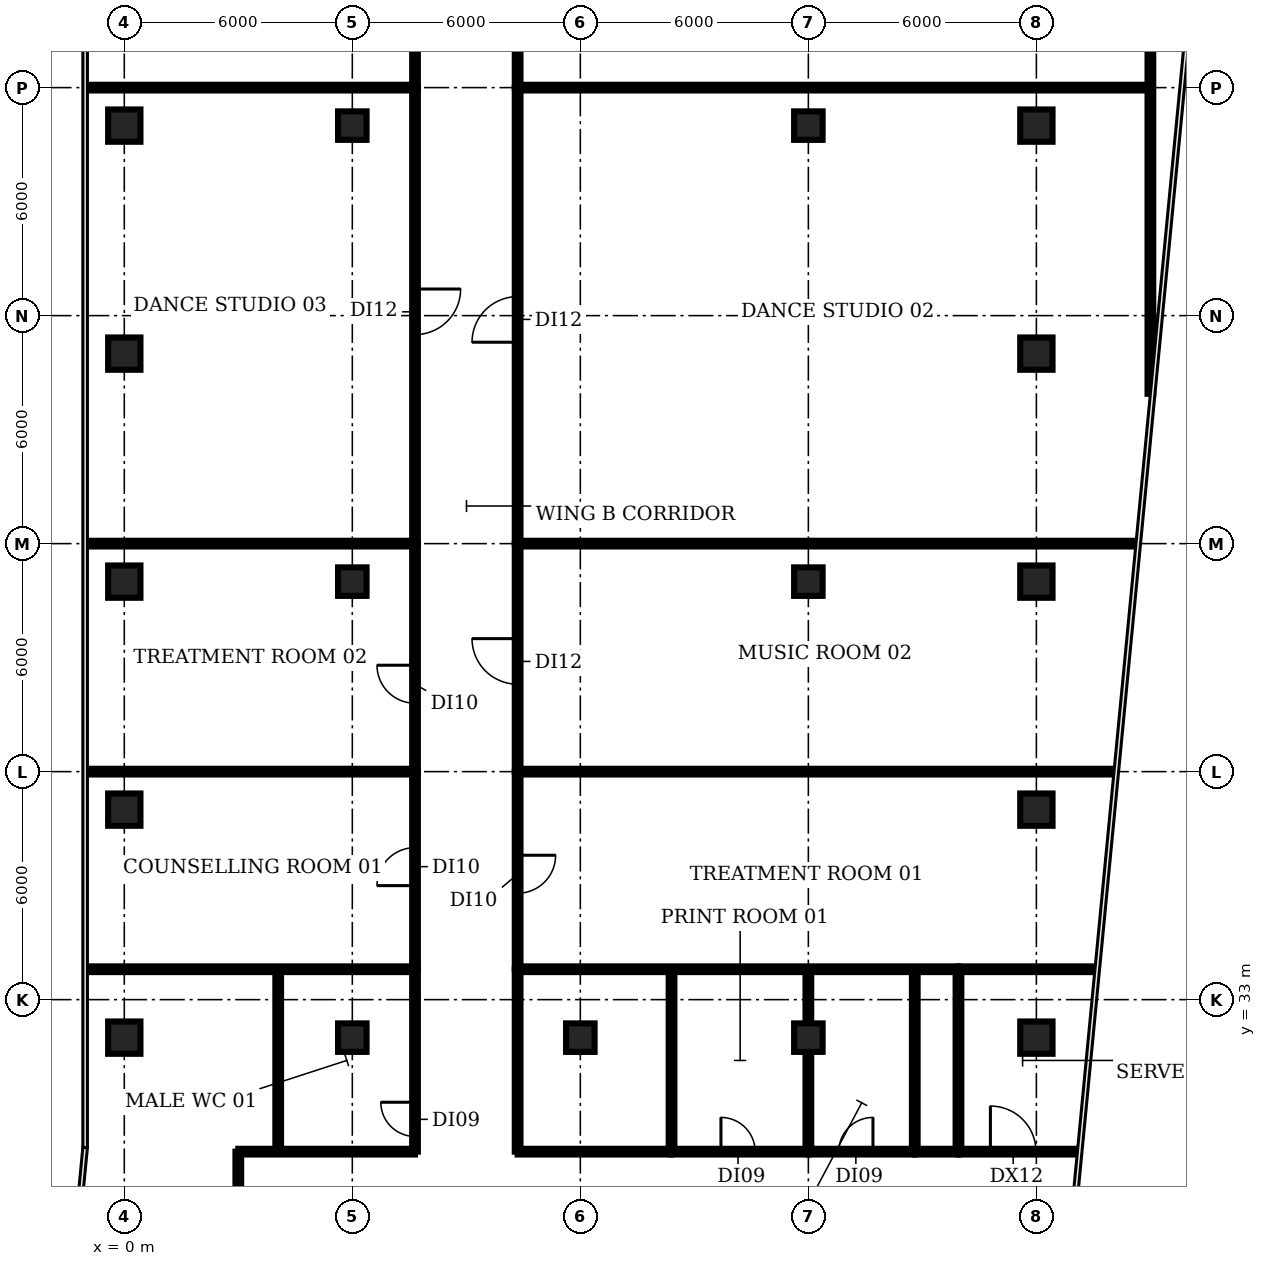
"""IFC4 building model, lengths in metres.
Left out: names, types, materials, properties, quantities, classifications, styles, units other than length and angle.
Written with IfcOpenShell. Run it as: python <this file> out.ifc"""

import sys

from ifc_helpers import new_model, si_unit, direction, frame, frame_2d, origin, origin_2d, place, context, subcontext, project, spatial, rectangle, extrude, element, fill, save


model = new_model("IFC4")
c1 = context("Model", 3, precision=1e-05, world=origin(), true_north=direction((0.0, 1.0)))
c2 = subcontext(c1, "Body", "Model", "MODEL_VIEW")
j1 = project(units=[si_unit("LENGTHUNIT", "METRE"), si_unit("PLANEANGLEUNIT", "RADIAN")], contexts=[c1])
p1 = place(None, origin())
s1 = spatial("IfcSite", under=j1, at=p1, CompositionType="ELEMENT")
p2 = place(p1, origin())
s2 = spatial("IfcBuilding", under=s1, at=p2, CompositionType="ELEMENT")
p3 = place(p2, frame((0.0, 0.0, 264.2)))
s3 = spatial("IfcBuildingStorey", under=s2, at=p3, CompositionType="ELEMENT", Elevation=264.2)
for number, where, z_axis, x_axis in (
    (1, (0.0, 32.0, -0.35), (0.0, 0.0, 1.0), (1.0, 0.0, 0.0)),
    (2, (0.0, 38.0, -0.35), (0.0, 0.0, 1.0), (1.0, 0.0, 0.0)),
    (3, (0.0, 44.0, -0.35), (0.0, 0.0, 1.0), (1.0, 0.0, 0.0)),
    (4, (0.0, 50.0, -0.35), (0.0, 0.0, 1.0), (1.0, 0.0, 0.0)),
    (5, (0.0, 56.0, -0.35), (0.0, 0.0, 1.0), (1.0, 0.0, 0.0)),
):
    element("IfcColumn", number, at=place(p3, frame(where, z_axis=z_axis, x_axis=x_axis)), inside=s3, PredefinedType="COLUMN", context=c2, shape_type="SweptSolid", body=[
        extrude(rectangle(XDim=0.85, YDim=0.85, at=origin_2d()), origin(), (0.0, 0.0, 1.0), 4.2),
    ])
for number, where, z_axis, x_axis in (
    (6, (6.0, 32.0, -0.35), (0.0, 0.0, 1.0), (1.0, 0.0, 0.0)),
    (7, (6.0, 44.0, -0.35), (0.0, 0.0, 1.0), (1.0, 0.0, 0.0)),
    (8, (6.0, 56.0, -0.35), (0.0, 0.0, 1.0), (1.0, 0.0, 0.0)),
    (9, (12.0, 32.0, -0.35), (0.0, 0.0, 1.0), (1.0, 0.0, 0.0)),
    (10, (18.0, 32.0, -0.35), (0.0, 0.0, 1.0), (1.0, 0.0, 0.0)),
    (11, (18.0, 44.0, -0.35), (0.0, 0.0, 1.0), (1.0, 0.0, 0.0)),
    (12, (18.0, 56.0, -0.35), (0.0, 0.0, 1.0), (1.0, 0.0, 0.0)),
):
    element("IfcColumn", number, at=place(p3, frame(where, z_axis=z_axis, x_axis=x_axis)), inside=s3, PredefinedType="COLUMN", context=c2, shape_type="SweptSolid", body=[
        extrude(rectangle(XDim=0.75, YDim=0.75, at=origin_2d()), origin(), (0.0, 0.0, 1.0), 4.2),
    ])
for number, where, z_axis, x_axis in (
    (13, (24.0, 32.0, -0.35), (0.0, 0.0, 1.0), (1.0, 0.0, 0.0)),
    (14, (24.0, 38.0, -0.35), (0.0, 0.0, 1.0), (1.0, 0.0, 0.0)),
    (15, (24.0, 44.0, -0.35), (0.0, 0.0, 1.0), (1.0, 0.0, 0.0)),
    (16, (24.0, 50.0, -0.35), (0.0, 0.0, 1.0), (1.0, 0.0, 0.0)),
    (17, (24.0, 56.0, -0.35), (0.0, 0.0, 1.0), (1.0, 0.0, 0.0)),
):
    element("IfcColumn", number, at=place(p3, frame(where, z_axis=z_axis, x_axis=x_axis)), inside=s3, PredefinedType="COLUMN", context=c2, shape_type="SweptSolid", body=[
        extrude(rectangle(XDim=0.85, YDim=0.85, at=origin_2d()), origin(), (0.0, 0.0, 1.0), 4.2),
    ])
for number, where, z_axis, x_axis in (
    (18, (-0.98, 33.8, 0.0), (0.0, 0.0, 1.0), (1.0, 0.0, 0.0)),
    (19, (-0.98, 39.0, 0.0), (0.0, 0.0, 1.0), (1.0, 0.0, 0.0)),
    (20, (-0.98, 45.0, 0.0), (0.0, 0.0, 1.0), (1.0, 0.0, 0.0)),
    (21, (-0.98, 57.0, 0.0), (0.0, 0.0, 1.0), (1.0, 0.0, 0.0)),
):
    element("IfcWall", number, at=place(p3, frame(where, z_axis=z_axis, x_axis=x_axis)), inside=s3, PredefinedType="PARTITIONING", context=c2, shape_type="SweptSolid", body=[
        extrude(rectangle(XDim=8.63, YDim=0.15, at=frame_2d((4.315, 0.0))), origin(), (0.0, 0.0, 1.0), 2.9),
    ])
p4 = place(p3, frame((3.0, 25.1, 0.0), z_axis=(0.0, 0.0, 1.0), x_axis=(0.0, 1.0, 0.0)))
e22 = element("IfcWall", 22, at=p4, inside=s3, PredefinedType="PARTITIONING", context=c2, shape_type="SweptSolid", body=[
    extrude(rectangle(XDim=3.9, YDim=0.15, at=frame_2d((1.95, 0.0))), origin(), (0.0, 0.0, 1.0), 2.9),
])
p5 = place(p3, frame((3.0, 29.0, 0.0), z_axis=(0.0, 0.0, 1.0), x_axis=(1.0, 0.0, 0.0)))
e23 = element("IfcWall", 23, at=p5, inside=s3, PredefinedType="PARTITIONING", context=c2, shape_type="SweptSolid", body=[
    extrude(rectangle(XDim=4.65, YDim=0.15, at=frame_2d((2.325, 0.0))), origin(), (0.0, 0.0, 1.0), 2.9),
])
p6 = place(p3, frame((4.05, 29.0, 0.0), z_axis=(0.0, 0.0, 1.0), x_axis=(0.0, 1.0, 0.0)))
e24 = element("IfcWall", 24, at=p6, inside=s3, PredefinedType="PARTITIONING", context=c2, shape_type="SweptSolid", body=[
    extrude(rectangle(XDim=4.8, YDim=0.15, at=frame_2d((2.4, 0.0))), origin(), (0.0, 0.0, 1.0), 2.9),
])
p7 = place(p3, frame((7.65, 29.0, 0.0), z_axis=(0.0, 0.0, 1.0), x_axis=(0.0, 1.0, 0.0)))
e25 = element("IfcWall", 25, at=p7, inside=s3, PredefinedType="PARTITIONING", context=c2, shape_type="SweptSolid", body=[
    extrude(rectangle(XDim=4.8, YDim=0.15, at=frame_2d((2.4, 0.0))), origin(), (0.0, 0.0, 1.0), 2.9),
])
p8 = place(p7, frame((0.4, 0.0, 0.0)))
e26 = element("IfcOpeningElement", 26, at=p8, cuts=e25, PredefinedType="OPENING", context=c2, shape_type="SweptSolid", body=[
    extrude(rectangle(XDim=0.9, YDim=2.1, at=frame_2d((0.45, 1.05))), frame((0.0, 0.085, 0.0), z_axis=(0.0, -1.0, 0.0), x_axis=(1.0, 0.0, 0.0)), (0.0, 0.0, 1.0), 0.17),
])
p9 = place(p3, frame((7.65, 33.8, 0.0), z_axis=(0.0, 0.0, 1.0), x_axis=(0.0, 1.0, 0.0)))
e27 = element("IfcWall", 27, at=p9, inside=s3, PredefinedType="PARTITIONING", context=c2, shape_type="SweptSolid", body=[
    extrude(rectangle(XDim=5.2, YDim=0.15, at=frame_2d((2.6, 0.0))), origin(), (0.0, 0.0, 1.0), 2.9),
])
p10 = place(p9, frame((2.2, 0.0, 0.0)))
e28 = element("IfcOpeningElement", 28, at=p10, cuts=e27, PredefinedType="OPENING", context=c2, shape_type="SweptSolid", body=[
    extrude(rectangle(XDim=1.0, YDim=2.1, at=frame_2d((0.5, 1.05))), frame((0.0, 0.085, 0.0), z_axis=(0.0, -1.0, 0.0), x_axis=(1.0, 0.0, 0.0)), (0.0, 0.0, 1.0), 0.17),
])
p11 = place(p3, frame((7.65, 39.0, 0.0), z_axis=(0.0, 0.0, 1.0), x_axis=(0.0, 1.0, 0.0)))
e29 = element("IfcWall", 29, at=p11, inside=s3, PredefinedType="PARTITIONING", context=c2, shape_type="SweptSolid", body=[
    extrude(rectangle(XDim=6.0, YDim=0.15, at=frame_2d((3.0, 0.0))), origin(), (0.0, 0.0, 1.0), 2.9),
])
p12 = place(p11, frame((1.8, 0.0, 0.0)))
e30 = element("IfcOpeningElement", 30, at=p12, cuts=e29, PredefinedType="OPENING", context=c2, shape_type="SweptSolid", body=[
    extrude(rectangle(XDim=1.0, YDim=2.1, at=frame_2d((0.5, 1.05))), frame((0.0, 0.085, 0.0), z_axis=(0.0, -1.0, 0.0), x_axis=(1.0, 0.0, 0.0)), (0.0, 0.0, 1.0), 0.17),
])
p13 = place(p3, frame((7.65, 57.0, 0.0), z_axis=(0.0, 0.0, 1.0), x_axis=(0.0, -1.0, 0.0)))
e31 = element("IfcWall", 31, at=p13, inside=s3, PredefinedType="PARTITIONING", context=c2, shape_type="SweptSolid", body=[
    extrude(rectangle(XDim=12.0, YDim=0.15, at=frame_2d((6.0, 0.0))), origin(), (0.0, 0.0, 1.0), 2.9),
])
p14 = place(p13, frame((5.3, 0.0, 0.0)))
e32 = element("IfcOpeningElement", 32, at=p14, cuts=e31, PredefinedType="OPENING", context=c2, shape_type="SweptSolid", body=[
    extrude(rectangle(XDim=1.2, YDim=2.1, at=frame_2d((0.6, 1.05))), frame((0.0, 0.085, 0.0), z_axis=(0.0, -1.0, 0.0), x_axis=(1.0, 0.0, 0.0)), (0.0, 0.0, 1.0), 0.17),
])
p15 = place(p3, frame((7.65, 57.0, 0.0), z_axis=(0.0, 0.0, 1.0), x_axis=(0.0, 1.0, 0.0)))
e33 = element("IfcWall", 33, at=p15, inside=s3, PredefinedType="PARTITIONING", context=c2, shape_type="SweptSolid", body=[
    extrude(rectangle(XDim=6.09, YDim=0.15, at=frame_2d((3.045, 0.0))), origin(), (0.0, 0.0, 1.0), 2.9),
])
p16 = place(p15, frame((1.78, 0.0, 0.0)))
e34 = element("IfcOpeningElement", 34, at=p16, cuts=e33, PredefinedType="OPENING", context=c2, shape_type="SweptSolid", body=[
    extrude(rectangle(XDim=1.0, YDim=2.1, at=frame_2d((0.5, 1.05))), frame((0.0, 0.085, 0.0), z_axis=(0.0, -1.0, 0.0), x_axis=(1.0, 0.0, 0.0)), (0.0, 0.0, 1.0), 0.17),
])
p17 = place(p3, frame((10.35, 29.0, 0.0), z_axis=(0.0, 0.0, 1.0), x_axis=(0.0, 1.0, 0.0)))
e35 = element("IfcWall", 35, at=p17, inside=s3, PredefinedType="PARTITIONING", context=c2, shape_type="SweptSolid", body=[
    extrude(rectangle(XDim=4.8, YDim=0.15, at=frame_2d((2.4, 0.0))), origin(), (0.0, 0.0, 1.0), 2.9),
])
p18 = place(p3, frame((10.35, 29.0, 0.0), z_axis=(0.0, 0.0, 1.0), x_axis=(1.0, 0.0, 0.0)))
e36 = element("IfcWall", 36, at=p18, inside=s3, PredefinedType="PARTITIONING", context=c2, shape_type="SweptSolid", body=[
    extrude(rectangle(XDim=4.05, YDim=0.15, at=frame_2d((2.025, 0.0))), origin(), (0.0, 0.0, 1.0), 2.9),
])
p19 = place(p3, frame((10.35, 33.8, 0.0), z_axis=(0.0, 0.0, 1.0), x_axis=(1.0, 0.0, 0.0)))
e37 = element("IfcWall", 37, at=p19, inside=s3, PredefinedType="PARTITIONING", context=c2, shape_type="SweptSolid", body=[
    extrude(rectangle(XDim=11.6, YDim=0.15, at=frame_2d((5.8, 0.0))), origin(), (0.0, 0.0, 1.0), 2.9),
])
p20 = place(p3, frame((10.35, 39.0, 0.0), z_axis=(0.0, 0.0, 1.0), x_axis=(0.0, -1.0, 0.0)))
e38 = element("IfcWall", 38, at=p20, inside=s3, PredefinedType="PARTITIONING", context=c2, shape_type="SweptSolid", body=[
    extrude(rectangle(XDim=5.2, YDim=0.15, at=frame_2d((2.6, 0.0))), origin(), (0.0, 0.0, 1.0), 2.9),
])
p21 = place(p20, frame((2.2, 0.0, 0.0)))
e39 = element("IfcOpeningElement", 39, at=p21, cuts=e38, PredefinedType="OPENING", context=c2, shape_type="SweptSolid", body=[
    extrude(rectangle(XDim=1.0, YDim=2.1, at=frame_2d((0.5, 1.05))), frame((0.0, 0.085, 0.0), z_axis=(0.0, -1.0, 0.0), x_axis=(1.0, 0.0, 0.0)), (0.0, 0.0, 1.0), 0.17),
])
p22 = place(p3, frame((10.35, 39.0, 0.0), z_axis=(0.0, 0.0, 1.0), x_axis=(0.0, 1.0, 0.0)))
e40 = element("IfcWall", 40, at=p22, inside=s3, PredefinedType="PARTITIONING", context=c2, shape_type="SweptSolid", body=[
    extrude(rectangle(XDim=6.0, YDim=0.15, at=frame_2d((3.0, 0.0))), origin(), (0.0, 0.0, 1.0), 2.9),
])
p23 = place(p22, frame((2.3, 0.0, 0.0)))
e41 = element("IfcOpeningElement", 41, at=p23, cuts=e40, PredefinedType="OPENING", context=c2, shape_type="SweptSolid", body=[
    extrude(rectangle(XDim=1.2, YDim=2.1, at=frame_2d((0.6, 1.05))), frame((0.0, 0.085, 0.0), z_axis=(0.0, -1.0, 0.0), x_axis=(1.0, 0.0, 0.0)), (0.0, 0.0, 1.0), 0.17),
])
p24 = place(p3, frame((10.35, 39.0, 0.0), z_axis=(0.0, 0.0, 1.0), x_axis=(1.0, 0.0, 0.0)))
e42 = element("IfcWall", 42, at=p24, inside=s3, PredefinedType="PARTITIONING", context=c2, shape_type="SweptSolid", body=[
    extrude(rectangle(XDim=15.7, YDim=0.15, at=frame_2d((7.85, 0.0))), origin(), (0.0, 0.0, 1.0), 2.9),
])
p25 = place(p3, frame((10.35, 45.0, 0.0), z_axis=(0.0, 0.0, 1.0), x_axis=(0.0, 1.0, 0.0)))
e43 = element("IfcWall", 43, at=p25, inside=s3, PredefinedType="PARTITIONING", context=c2, shape_type="SweptSolid", body=[
    extrude(rectangle(XDim=12.0, YDim=0.15, at=frame_2d((6.0, 0.0))), origin(), (0.0, 0.0, 1.0), 2.9),
])
p26 = place(p25, frame((5.3, 0.0, 0.0)))
e44 = element("IfcOpeningElement", 44, at=p26, cuts=e43, PredefinedType="OPENING", context=c2, shape_type="SweptSolid", body=[
    extrude(rectangle(XDim=1.2, YDim=2.1, at=frame_2d((0.6, 1.05))), frame((0.0, 0.085, 0.0), z_axis=(0.0, -1.0, 0.0), x_axis=(1.0, 0.0, 0.0)), (0.0, 0.0, 1.0), 0.17),
])
p27 = place(p3, frame((10.35, 45.0, 0.0), z_axis=(0.0, 0.0, 1.0), x_axis=(1.0, 0.0, 0.0)))
e45 = element("IfcWall", 45, at=p27, inside=s3, PredefinedType="PARTITIONING", context=c2, shape_type="SweptSolid", body=[
    extrude(rectangle(XDim=16.28, YDim=0.15, at=frame_2d((8.14, 0.0))), origin(), (0.0, 0.0, 1.0), 2.9),
])
p28 = place(p3, frame((10.35, 57.0, 0.0), z_axis=(0.0, 0.0, 1.0), x_axis=(0.0, 1.0, 0.0)))
e46 = element("IfcWall", 46, at=p28, inside=s3, PredefinedType="PARTITIONING", context=c2, shape_type="SweptSolid", body=[
    extrude(rectangle(XDim=6.09, YDim=0.15, at=frame_2d((3.045, 0.0))), origin(), (0.0, 0.0, 1.0), 2.9),
])
p29 = place(p28, frame((1.7, 0.0, 0.0)))
e47 = element("IfcOpeningElement", 47, at=p29, cuts=e46, PredefinedType="OPENING", context=c2, shape_type="SweptSolid", body=[
    extrude(rectangle(XDim=1.2, YDim=2.1, at=frame_2d((0.6, 1.05))), frame((0.0, 0.085, 0.0), z_axis=(0.0, -1.0, 0.0), x_axis=(1.0, 0.0, 0.0)), (0.0, 0.0, 1.0), 0.17),
])
p30 = place(p3, frame((10.35, 57.0, 0.0), z_axis=(0.0, 0.0, 1.0), x_axis=(1.0, 0.0, 0.0)))
e48 = element("IfcWall", 48, at=p30, inside=s3, PredefinedType="PARTITIONING", context=c2, shape_type="SweptSolid", body=[
    extrude(rectangle(XDim=16.65, YDim=0.15, at=frame_2d((8.325, 0.0))), origin(), (0.0, 0.0, 1.0), 2.9),
])
p31 = place(p3, frame((14.4, 29.0, 0.0), z_axis=(0.0, 0.0, 1.0), x_axis=(0.0, 1.0, 0.0)))
e49 = element("IfcWall", 49, at=p31, inside=s3, PredefinedType="PARTITIONING", context=c2, shape_type="SweptSolid", body=[
    extrude(rectangle(XDim=4.8, YDim=0.15, at=frame_2d((2.4, 0.0))), origin(), (0.0, 0.0, 1.0), 2.9),
])
p32 = place(p3, frame((14.4, 29.0, 0.0), z_axis=(0.0, 0.0, 1.0), x_axis=(1.0, 0.0, 0.0)))
e50 = element("IfcWall", 50, at=p32, inside=s3, PredefinedType="PARTITIONING", context=c2, shape_type="SweptSolid", body=[
    extrude(rectangle(XDim=3.6, YDim=0.15, at=frame_2d((1.8, 0.0))), origin(), (0.0, 0.0, 1.0), 2.9),
])
p33 = place(p32, frame((1.3, 0.0, 0.0)))
e51 = element("IfcOpeningElement", 51, at=p33, cuts=e50, PredefinedType="OPENING", context=c2, shape_type="SweptSolid", body=[
    extrude(rectangle(XDim=0.9, YDim=2.1, at=frame_2d((0.45, 1.05))), frame((0.0, 0.085, 0.0), z_axis=(0.0, -1.0, 0.0), x_axis=(1.0, 0.0, 0.0)), (0.0, 0.0, 1.0), 0.17),
])
p34 = place(p3, frame((18.0, 29.0, 0.0), z_axis=(0.0, 0.0, 1.0), x_axis=(0.0, 1.0, 0.0)))
e52 = element("IfcWall", 52, at=p34, inside=s3, PredefinedType="PARTITIONING", context=c2, shape_type="SweptSolid", body=[
    extrude(rectangle(XDim=4.8, YDim=0.15, at=frame_2d((2.4, 0.0))), origin(), (0.0, 0.0, 1.0), 2.9),
])
p35 = place(p3, frame((18.0, 29.0, 0.0), z_axis=(0.0, 0.0, 1.0), x_axis=(1.0, 0.0, 0.0)))
e53 = element("IfcWall", 53, at=p35, inside=s3, PredefinedType="PARTITIONING", context=c2, shape_type="SweptSolid", body=[
    extrude(rectangle(XDim=2.8, YDim=0.15, at=frame_2d((1.4, 0.0))), origin(), (0.0, 0.0, 1.0), 2.9),
])
p36 = place(p35, frame((0.8, 0.0, 0.0)))
e54 = element("IfcOpeningElement", 54, at=p36, cuts=e53, PredefinedType="OPENING", context=c2, shape_type="SweptSolid", body=[
    extrude(rectangle(XDim=0.9, YDim=2.1, at=frame_2d((0.45, 1.05))), frame((0.0, 0.085, 0.0), z_axis=(0.0, -1.0, 0.0), x_axis=(1.0, 0.0, 0.0)), (0.0, 0.0, 1.0), 0.17),
])
p37 = place(p3, frame((20.8, 29.0, 0.0), z_axis=(0.0, 0.0, 1.0), x_axis=(0.0, 1.0, 0.0)))
e55 = element("IfcWall", 55, at=p37, inside=s3, PredefinedType="PARTITIONING", context=c2, shape_type="SweptSolid", body=[
    extrude(rectangle(XDim=4.8, YDim=0.15, at=frame_2d((2.4, 0.0))), origin(), (0.0, 0.0, 1.0), 2.9),
])
p38 = place(p3, frame((20.8, 29.0, 0.0), z_axis=(0.0, 0.0, 1.0), x_axis=(1.0, 0.0, 0.0)))
e56 = element("IfcWall", 56, at=p38, inside=s3, PredefinedType="PARTITIONING", context=c2, shape_type="SweptSolid", body=[
    extrude(rectangle(XDim=1.15, YDim=0.15, at=frame_2d((0.575, 0.0))), origin(), (0.0, 0.0, 1.0), 2.9),
])
p39 = place(p3, frame((21.95, 29.0, 0.0), z_axis=(0.0, 0.0, 1.0), x_axis=(0.0, 1.0, 0.0)))
e57 = element("IfcWall", 57, at=p39, inside=s3, PredefinedType="PARTITIONING", context=c2, shape_type="SweptSolid", body=[
    extrude(rectangle(XDim=4.8, YDim=0.15, at=frame_2d((2.4, 0.0))), origin(), (0.0, 0.0, 1.0), 2.9),
])
p40 = place(p3, frame((21.95, 29.0, 0.0), z_axis=(0.0, 0.0, 1.0), x_axis=(1.0, 0.0, 0.0)))
e58 = element("IfcWall", 58, at=p40, inside=s3, PredefinedType="PARTITIONING", context=c2, shape_type="SweptSolid", body=[
    extrude(rectangle(XDim=3.14, YDim=0.15, at=frame_2d((1.57, 0.0))), origin(), (0.0, 0.0, 1.0), 2.9),
])
p41 = place(p40, frame((0.84, 0.0, 0.0)))
e59 = element("IfcOpeningElement", 59, at=p41, cuts=e58, PredefinedType="OPENING", context=c2, shape_type="SweptSolid", body=[
    extrude(rectangle(XDim=1.2, YDim=2.1, at=frame_2d((0.6, 1.05))), frame((0.0, 0.085, 0.0), z_axis=(0.0, -1.0, 0.0), x_axis=(1.0, 0.0, 0.0)), (0.0, 0.0, 1.0), 0.17),
])
p42 = place(p3, frame((21.95, 33.8, 0.0), z_axis=(0.0, 0.0, 1.0), x_axis=(1.0, 0.0, 0.0)))
e60 = element("IfcWall", 60, at=p42, inside=s3, PredefinedType="PARTITIONING", context=c2, shape_type="SweptSolid", body=[
    extrude(rectangle(XDim=3.6, YDim=0.15, at=frame_2d((1.8, 0.0))), origin(), (0.0, 0.0, 1.0), 2.9),
])
p43 = place(p3, frame((27.0, 48.942, 0.0), z_axis=(0.0, 0.0, 1.0), x_axis=(0.0, 1.0, 0.0)))
e61 = element("IfcWall", 61, at=p43, inside=s3, PredefinedType="PARTITIONING", context=c2, shape_type="SweptSolid", body=[
    extrude(rectangle(XDim=12.948, YDim=0.15, at=frame_2d((6.474, 0.0))), origin(), (0.0, 0.0, 1.0), 2.9),
])
p44 = place(p8, origin())
e62 = element("IfcDoor", 62, at=p44, inside=s3, OperationType="SINGLE_SWING_RIGHT", PredefinedType="DOOR", context=c2, shape_type="SweptSolid", body=[
    extrude(rectangle(XDim=0.9, YDim=2.1, at=frame_2d((0.45, 1.05))), frame((0.0, 0.025, 0.0), z_axis=(0.0, -1.0, 0.0), x_axis=(1.0, 0.0, 0.0)), (0.0, 0.0, 1.0), 0.05),
])
fill(e26, e62)
p45 = place(p10, origin())
e63 = element("IfcDoor", 63, at=p45, inside=s3, OperationType="SINGLE_SWING_LEFT", PredefinedType="DOOR", context=c2, shape_type="SweptSolid", body=[
    extrude(rectangle(XDim=1.0, YDim=2.1, at=frame_2d((0.5, 1.05))), frame((0.0, 0.025, 0.0), z_axis=(0.0, -1.0, 0.0), x_axis=(1.0, 0.0, 0.0)), (0.0, 0.0, 1.0), 0.05),
])
fill(e28, e63)
p46 = place(p12, origin())
e64 = element("IfcDoor", 64, at=p46, inside=s3, OperationType="SINGLE_SWING_RIGHT", PredefinedType="DOOR", context=c2, shape_type="SweptSolid", body=[
    extrude(rectangle(XDim=1.0, YDim=2.1, at=frame_2d((0.5, 1.05))), frame((0.0, 0.025, 0.0), z_axis=(0.0, -1.0, 0.0), x_axis=(1.0, 0.0, 0.0)), (0.0, 0.0, 1.0), 0.05),
])
fill(e30, e64)
p47 = place(p14, origin())
e65 = element("IfcDoor", 65, at=p47, inside=s3, OperationType="SINGLE_SWING_LEFT", PredefinedType="DOOR", context=c2, shape_type="SweptSolid", body=[
    extrude(rectangle(XDim=1.2, YDim=2.1, at=frame_2d((0.6, 1.05))), frame((0.0, 0.025, 0.0), z_axis=(0.0, -1.0, 0.0), x_axis=(1.0, 0.0, 0.0)), (0.0, 0.0, 1.0), 0.05),
])
fill(e32, e65)
p48 = place(p21, origin())
e66 = element("IfcDoor", 66, at=p48, inside=s3, OperationType="SINGLE_SWING_LEFT", PredefinedType="DOOR", context=c2, shape_type="SweptSolid", body=[
    extrude(rectangle(XDim=1.0, YDim=2.1, at=frame_2d((0.5, 1.05))), frame((0.0, 0.025, 0.0), z_axis=(0.0, -1.0, 0.0), x_axis=(1.0, 0.0, 0.0)), (0.0, 0.0, 1.0), 0.05),
])
fill(e39, e66)
p49 = place(p23, origin())
e67 = element("IfcDoor", 67, at=p49, inside=s3, OperationType="SINGLE_SWING_RIGHT", PredefinedType="DOOR", context=c2, shape_type="SweptSolid", body=[
    extrude(rectangle(XDim=1.2, YDim=2.1, at=frame_2d((0.6, 1.05))), frame((0.0, 0.025, 0.0), z_axis=(0.0, -1.0, 0.0), x_axis=(1.0, 0.0, 0.0)), (0.0, 0.0, 1.0), 0.05),
])
fill(e41, e67)
p50 = place(p26, origin())
e68 = element("IfcDoor", 68, at=p50, inside=s3, OperationType="SINGLE_SWING_LEFT", PredefinedType="DOOR", context=c2, shape_type="SweptSolid", body=[
    extrude(rectangle(XDim=1.2, YDim=2.1, at=frame_2d((0.6, 1.05))), frame((0.0, 0.025, 0.0), z_axis=(0.0, -1.0, 0.0), x_axis=(1.0, 0.0, 0.0)), (0.0, 0.0, 1.0), 0.05),
])
fill(e44, e68)
p51 = place(p33, origin())
e69 = element("IfcDoor", 69, at=p51, inside=s3, OperationType="SINGLE_SWING_LEFT", PredefinedType="DOOR", context=c2, shape_type="SweptSolid", body=[
    extrude(rectangle(XDim=0.9, YDim=2.1, at=frame_2d((0.45, 1.05))), frame((0.0, 0.025, 0.0), z_axis=(0.0, -1.0, 0.0), x_axis=(1.0, 0.0, 0.0)), (0.0, 0.0, 1.0), 0.05),
])
fill(e51, e69)
p52 = place(p36, origin())
e70 = element("IfcDoor", 70, at=p52, inside=s3, OperationType="SINGLE_SWING_RIGHT", PredefinedType="DOOR", context=c2, shape_type="SweptSolid", body=[
    extrude(rectangle(XDim=0.9, YDim=2.1, at=frame_2d((0.45, 1.05))), frame((0.0, 0.025, 0.0), z_axis=(0.0, -1.0, 0.0), x_axis=(1.0, 0.0, 0.0)), (0.0, 0.0, 1.0), 0.05),
])
fill(e54, e70)
p53 = place(p41, origin())
e71 = element("IfcDoor", 71, at=p53, inside=s3, OperationType="SINGLE_SWING_LEFT", PredefinedType="DOOR", context=c2, shape_type="SweptSolid", body=[
    extrude(rectangle(XDim=1.2, YDim=2.1, at=frame_2d((0.6, 1.05))), frame((0.0, 0.025, 0.0), z_axis=(0.0, -1.0, 0.0), x_axis=(1.0, 0.0, 0.0)), (0.0, 0.0, 1.0), 0.05),
])
fill(e59, e71)
save(model, sys.argv[1])
